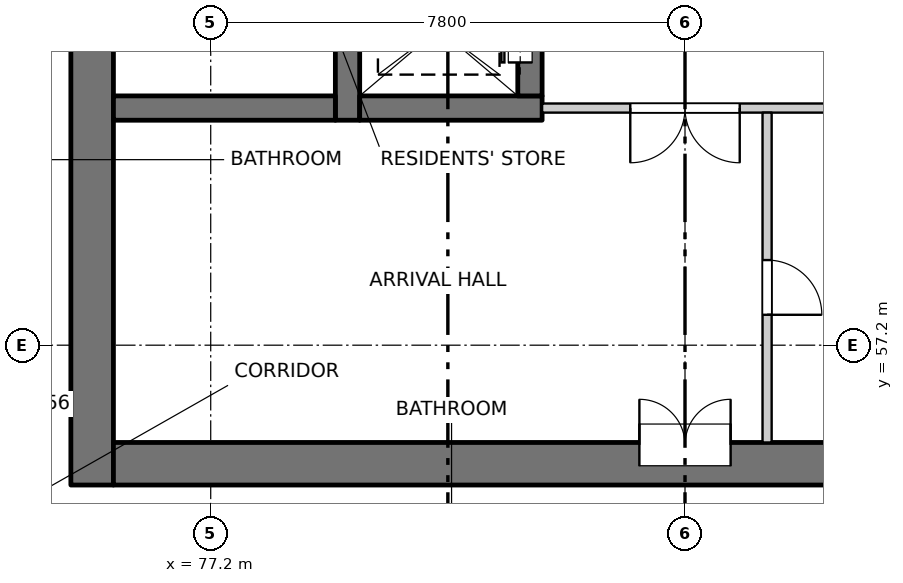
"""IFC4 building model, lengths in metres.
Left out: names, types, materials, properties, quantities, classifications, styles, units other than length and angle.
Written with IfcOpenShell. Run it as: python <this file> out.ifc"""

import sys

from ifc_helpers import new_model, si_unit, direction, frame, frame_2d, origin, place, context, subcontext, project, spatial, rectangle, extrude, element, fill, save


model = new_model("IFC4")
c1 = context("Model", 3, precision=1e-05, world=origin(), true_north=direction((0.0, 1.0)))
c2 = subcontext(c1, "Body", "Model", "MODEL_VIEW")
j1 = project(units=[si_unit("LENGTHUNIT", "METRE"), si_unit("PLANEANGLEUNIT", "RADIAN")], contexts=[c1])
p1 = place(None, origin())
s1 = spatial("IfcSite", under=j1, at=p1, CompositionType="ELEMENT")
p2 = place(p1, origin())
s2 = spatial("IfcBuilding", under=s1, at=p2, CompositionType="ELEMENT")
p3 = place(p2, frame((0.0, 0.0, 26.3)))
s3 = spatial("IfcBuildingStorey", under=s2, at=p3, CompositionType="ELEMENT", Elevation=26.3)
p4 = place(p3, frame((75.25, 54.9, -0.25), z_axis=(0.0, 0.0, 1.0), x_axis=(0.0, 1.0, 0.0)))
e1 = element("IfcWall", 1, at=p4, inside=s3, PredefinedType="SOLIDWALL", context=c2, shape_type="SweptSolid", body=[
    extrude(rectangle(XDim=22.4, YDim=0.7, at=frame_2d((11.2, 0.0))), origin(), (0.0, 0.0, 1.0), 3.4),
])
p5 = place(p4, frame((7.55, 0.0, 0.25)))
e2 = element("IfcOpeningElement", 2, at=p5, cuts=e1, PredefinedType="OPENING", context=c2, shape_type="SweptSolid", body=[
    extrude(rectangle(XDim=0.9, YDim=2.1, at=frame_2d((0.45, 1.05))), frame((0.0, 0.36, 0.0), z_axis=(0.0, -1.0, 0.0), x_axis=(1.0, 0.0, 0.0)), (0.0, 0.0, 1.0), 0.72),
])
p6 = place(p4, frame((10.85, 0.0, 0.25)))
e3 = element("IfcOpeningElement", 3, at=p6, cuts=e1, PredefinedType="OPENING", context=c2, shape_type="SweptSolid", body=[
    extrude(rectangle(XDim=0.9, YDim=2.1, at=frame_2d((0.45, 1.05))), frame((0.0, 0.36, 0.0), z_axis=(0.0, -1.0, 0.0), x_axis=(1.0, 0.0, 0.0)), (0.0, 0.0, 1.0), 0.72),
])
p7 = place(p4, frame((15.35, 0.0, 0.25)))
e4 = element("IfcOpeningElement", 4, at=p7, cuts=e1, PredefinedType="OPENING", context=c2, shape_type="SweptSolid", body=[
    extrude(rectangle(XDim=0.9, YDim=2.1, at=frame_2d((0.45, 1.05))), frame((0.0, 0.36, 0.0), z_axis=(0.0, -1.0, 0.0), x_axis=(1.0, 0.0, 0.0)), (0.0, 0.0, 1.0), 0.72),
])
p8 = place(p4, frame((20.15, 0.0, 0.25)))
e5 = element("IfcOpeningElement", 5, at=p8, cuts=e1, PredefinedType="OPENING", context=c2, shape_type="SweptSolid", body=[
    extrude(rectangle(XDim=0.9, YDim=2.1, at=frame_2d((0.45, 1.05))), frame((0.0, 0.36, 0.0), z_axis=(0.0, -1.0, 0.0), x_axis=(1.0, 0.0, 0.0)), (0.0, 0.0, 1.0), 0.72),
])
p9 = place(p3, frame((75.6, 55.25, -0.25), z_axis=(0.0, 0.0, 1.0), x_axis=(1.0, 0.0, 0.0)))
e6 = element("IfcWall", 6, at=p9, inside=s3, PredefinedType="SOLIDWALL", context=c2, shape_type="SweptSolid", body=[
    extrude(rectangle(XDim=18.8, YDim=0.7, at=frame_2d((9.4, 0.0))), origin(), (0.0, 0.0, 1.0), 3.4),
])
p10 = place(p9, frame((8.65, 0.0, 0.25)))
e7 = element("IfcOpeningElement", 7, at=p10, cuts=e6, PredefinedType="OPENING", context=c2, shape_type="SweptSolid", body=[
    extrude(rectangle(XDim=1.5, YDim=2.1, at=frame_2d((0.75, 1.05))), frame((0.0, 0.36, 0.0), z_axis=(0.0, -1.0, 0.0), x_axis=(1.0, 0.0, 0.0)), (0.0, 0.0, 1.0), 0.72),
])
p11 = place(p3, frame((79.45, 60.9, -0.25), z_axis=(0.0, 0.0, 1.0), x_axis=(0.0, 1.0, 0.0)))
e8 = element("IfcWall", 8, at=p11, inside=s3, PredefinedType="SOLIDWALL", context=c2, shape_type="SweptSolid", body=[
    extrude(rectangle(XDim=16.4, YDim=0.4, at=frame_2d((8.2, 0.0))), origin(), (0.0, 0.0, 1.0), 3.4),
])
p12 = place(p3, frame((79.65, 61.1, -0.25), z_axis=(0.0, 0.0, 1.0), x_axis=(1.0, 0.0, 0.0)))
e9 = element("IfcWall", 9, at=p12, inside=s3, PredefinedType="SOLIDWALL", context=c2, shape_type="SweptSolid", body=[
    extrude(rectangle(XDim=3.0, YDim=0.4, at=frame_2d((1.5, 0.0))), origin(), (0.0, 0.0, 1.0), 3.4),
])
p13 = place(p3, frame((82.45, 61.3, -0.25), z_axis=(0.0, 0.0, 1.0), x_axis=(0.0, 1.0, 0.0)))
e10 = element("IfcWall", 10, at=p13, inside=s3, PredefinedType="SOLIDWALL", context=c2, shape_type="SweptSolid", body=[
    extrude(rectangle(XDim=2.2, YDim=0.4, at=frame_2d((1.1, 0.0))), origin(), (0.0, 0.0, 1.0), 3.4),
])
p14 = place(p13, frame((0.55, 0.0, 0.25)))
e11 = element("IfcOpeningElement", 11, at=p14, cuts=e10, PredefinedType="OPENING", context=c2, shape_type="SweptSolid", body=[
    extrude(rectangle(XDim=1.1, YDim=2.1, at=frame_2d((0.55, 1.05))), frame((0.0, 0.21, 0.0), z_axis=(0.0, -1.0, 0.0), x_axis=(1.0, 0.0, 0.0)), (0.0, 0.0, 1.0), 0.42),
])
p15 = place(p3, frame((75.6, 61.1, -0.25), z_axis=(0.0, 0.0, 1.0), x_axis=(1.0, 0.0, 0.0)))
e12 = element("IfcWall", 12, at=p15, inside=s3, PredefinedType="SOLIDWALL", context=c2, shape_type="SweptSolid", body=[
    extrude(rectangle(XDim=3.65, YDim=0.4, at=frame_2d((1.825, 0.0))), origin(), (0.0, 0.0, 1.0), 3.4),
])
p16 = place(p3, frame((82.65, 61.1, 0.0), z_axis=(0.0, 0.0, 1.0), x_axis=(1.0, 0.0, 0.0)))
e13 = element("IfcWall", 13, at=p16, inside=s3, PredefinedType="PARTITIONING", context=c2, shape_type="SweptSolid", body=[
    extrude(rectangle(XDim=4.7, YDim=0.15, at=frame_2d((2.35, 0.0))), origin(), (0.0, 0.0, 1.0), 3.15),
])
p17 = place(p16, frame((1.45, 0.0, 0.0)))
e14 = element("IfcOpeningElement", 14, at=p17, cuts=e13, PredefinedType="OPENING", context=c2, shape_type="SweptSolid", body=[
    extrude(rectangle(XDim=1.8, YDim=2.1, at=frame_2d((0.9, 1.05))), frame((0.0, 0.085, 0.0), z_axis=(0.0, -1.0, 0.0), x_axis=(1.0, 0.0, 0.0)), (0.0, 0.0, 1.0), 0.17),
])
p18 = place(p3, frame((86.35, 55.6, 0.0), z_axis=(0.0, 0.0, 1.0), x_axis=(0.0, 1.0, 0.0)))
e15 = element("IfcWall", 15, at=p18, inside=s3, PredefinedType="PARTITIONING", context=c2, shape_type="SweptSolid", body=[
    extrude(rectangle(XDim=5.425, YDim=0.15, at=frame_2d((2.712, 0.0))), origin(), (0.0, 0.0, 1.0), 3.15),
])
p19 = place(p18, frame((2.1, 0.0, 0.0)))
e16 = element("IfcOpeningElement", 16, at=p19, cuts=e15, PredefinedType="OPENING", context=c2, shape_type="SweptSolid", body=[
    extrude(rectangle(XDim=0.9, YDim=2.1, at=frame_2d((0.45, 1.05))), frame((0.0, 0.085, 0.0), z_axis=(0.0, -1.0, 0.0), x_axis=(1.0, 0.0, 0.0)), (0.0, 0.0, 1.0), 0.17),
])
p20 = place(p10, origin())
e17 = element("IfcDoor", 17, at=p20, inside=s3, OperationType="DOUBLE_DOOR_SINGLE_SWING", PredefinedType="DOOR", context=c2, shape_type="SweptSolid", body=[
    extrude(rectangle(XDim=1.5, YDim=2.1, at=frame_2d((0.75, 1.05))), frame((0.0, 0.335, 0.0), z_axis=(0.0, -1.0, 0.0), x_axis=(1.0, 0.0, 0.0)), (0.0, 0.0, 1.0), 0.05),
])
fill(e7, e17)
p21 = place(p19, origin())
e18 = element("IfcDoor", 18, at=p21, inside=s3, OperationType="SINGLE_SWING_RIGHT", PredefinedType="DOOR", context=c2, shape_type="SweptSolid", body=[
    extrude(rectangle(XDim=0.9, YDim=2.1, at=frame_2d((0.45, 1.05))), frame((0.0, 0.025, 0.0), z_axis=(0.0, -1.0, 0.0), x_axis=(1.0, 0.0, 0.0)), (0.0, 0.0, 1.0), 0.05),
])
fill(e16, e18)
p22 = place(p17, origin())
e19 = element("IfcDoor", 19, at=p22, inside=s3, OperationType="DOUBLE_DOOR_SINGLE_SWING", PredefinedType="DOOR", context=c2, shape_type="SweptSolid", body=[
    extrude(rectangle(XDim=1.8, YDim=2.1, at=frame_2d((0.9, 1.05))), frame((0.0, 0.025, 0.0), z_axis=(0.0, -1.0, 0.0), x_axis=(1.0, 0.0, 0.0)), (0.0, 0.0, 1.0), 0.05),
])
fill(e14, e19)
p23 = place(p14, origin())
e20 = element("IfcDoor", 20, at=p23, inside=s3, OperationType="SLIDING_TO_RIGHT", PredefinedType="DOOR", context=c2, shape_type="SweptSolid", body=[
    extrude(rectangle(XDim=1.1, YDim=2.1, at=frame_2d((0.55, 1.05))), frame((0.0, 0.185, 0.0), z_axis=(0.0, -1.0, 0.0), x_axis=(1.0, 0.0, 0.0)), (0.0, 0.0, 1.0), 0.05),
])
fill(e11, e20)
save(model, sys.argv[1])
